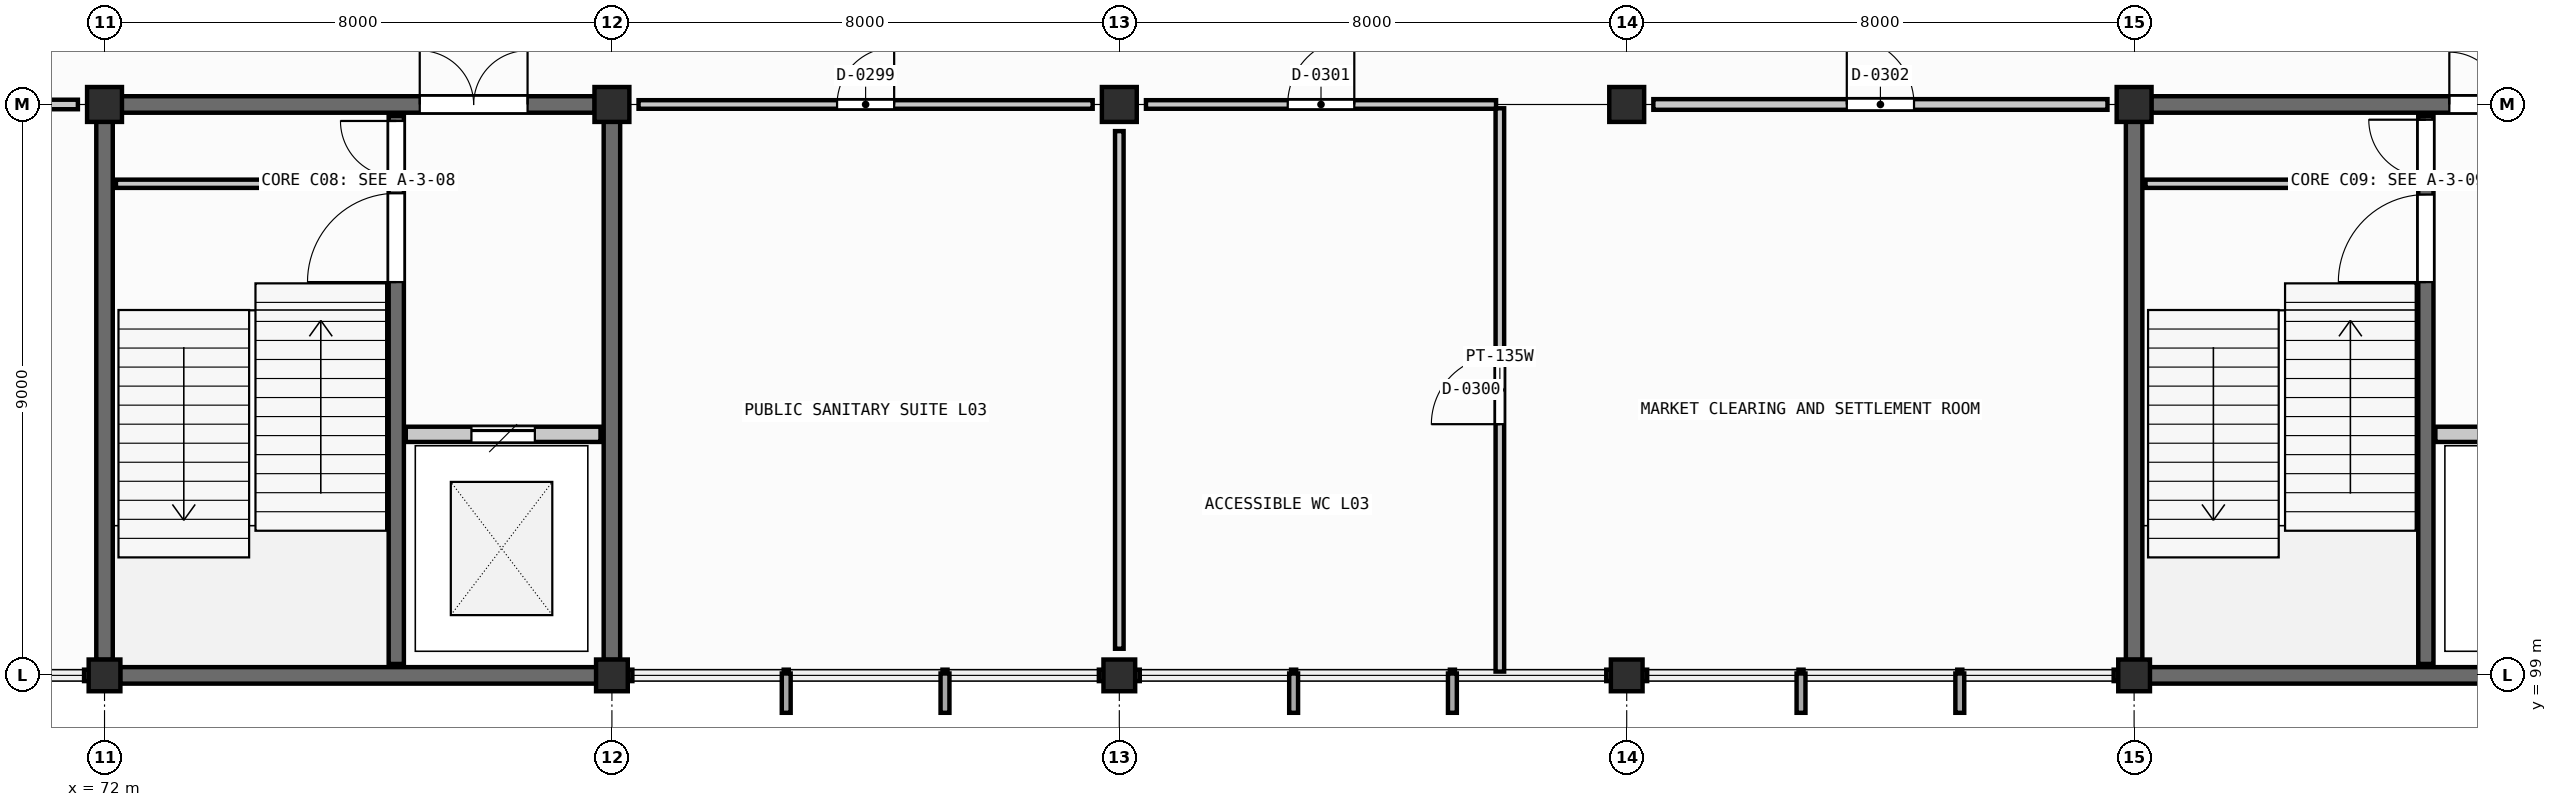
"""IFC4 building model, lengths in metres.
Left out: names, types, materials, properties, quantities, classifications, styles, units other than length and angle.
Written with IfcOpenShell. Run it as: python <this file> out.ifc"""

import sys

from ifc_helpers import new_model, si_unit, direction, frame, frame_2d, origin, origin_2d, place, context, subcontext, project, spatial, rectangle, extrude, element, fill, save


model = new_model("IFC4")
c1 = context("Model", 3, precision=1e-05, world=origin(), true_north=direction((0.0, 1.0)))
c2 = subcontext(c1, "Body", "Model", "MODEL_VIEW")
j1 = project(units=[si_unit("LENGTHUNIT", "METRE"), si_unit("PLANEANGLEUNIT", "RADIAN")], contexts=[c1])
p1 = place(None, origin())
s1 = spatial("IfcSite", under=j1, at=p1, CompositionType="ELEMENT")
p2 = place(p1, origin())
s2 = spatial("IfcBuilding", under=s1, at=p2, CompositionType="ELEMENT")
p3 = place(p2, frame((0.0, 0.0, 13.2)))
s3 = spatial("IfcBuildingStorey", under=s2, at=p3, CompositionType="ELEMENT", Elevation=13.2)
p4 = place(p3, frame((72.0, 99.0, 0.0), z_axis=(0.0, 0.0, 1.0), x_axis=(1.0, 0.0, 0.0)))
e1 = element("IfcColumn", 1, at=p4, inside=s3, PredefinedType="COLUMN", context=c2, shape_type="SweptSolid", body=[
    extrude(rectangle(XDim=0.5, YDim=0.5, at=origin_2d()), origin(), (0.0, 0.0, 1.0), 3.9),
])
p5 = place(p3, frame((72.0, 108.0, 0.0), z_axis=(0.0, 0.0, 1.0), x_axis=(1.0, 0.0, 0.0)))
e2 = element("IfcColumn", 2, at=p5, inside=s3, PredefinedType="COLUMN", context=c2, shape_type="SweptSolid", body=[
    extrude(rectangle(XDim=0.55, YDim=0.55, at=origin_2d()), origin(), (0.0, 0.0, 1.0), 3.9),
])
p6 = place(p3, frame((80.0, 99.0, 0.0), z_axis=(0.0, 0.0, 1.0), x_axis=(1.0, 0.0, 0.0)))
e3 = element("IfcColumn", 3, at=p6, inside=s3, PredefinedType="COLUMN", context=c2, shape_type="SweptSolid", body=[
    extrude(rectangle(XDim=0.5, YDim=0.5, at=origin_2d()), origin(), (0.0, 0.0, 1.0), 3.9),
])
p7 = place(p3, frame((80.0, 108.0, 0.0), z_axis=(0.0, 0.0, 1.0), x_axis=(1.0, 0.0, 0.0)))
e4 = element("IfcColumn", 4, at=p7, inside=s3, PredefinedType="COLUMN", context=c2, shape_type="SweptSolid", body=[
    extrude(rectangle(XDim=0.55, YDim=0.55, at=origin_2d()), origin(), (0.0, 0.0, 1.0), 3.9),
])
p8 = place(p3, frame((88.0, 99.0, 0.0), z_axis=(0.0, 0.0, 1.0), x_axis=(1.0, 0.0, 0.0)))
e5 = element("IfcColumn", 5, at=p8, inside=s3, PredefinedType="COLUMN", context=c2, shape_type="SweptSolid", body=[
    extrude(rectangle(XDim=0.5, YDim=0.5, at=origin_2d()), origin(), (0.0, 0.0, 1.0), 3.9),
])
p9 = place(p3, frame((88.0, 108.0, 0.0), z_axis=(0.0, 0.0, 1.0), x_axis=(1.0, 0.0, 0.0)))
e6 = element("IfcColumn", 6, at=p9, inside=s3, PredefinedType="COLUMN", context=c2, shape_type="SweptSolid", body=[
    extrude(rectangle(XDim=0.55, YDim=0.55, at=origin_2d()), origin(), (0.0, 0.0, 1.0), 3.9),
])
p10 = place(p3, frame((96.0, 99.0, 0.0), z_axis=(0.0, 0.0, 1.0), x_axis=(1.0, 0.0, 0.0)))
e7 = element("IfcColumn", 7, at=p10, inside=s3, PredefinedType="COLUMN", context=c2, shape_type="SweptSolid", body=[
    extrude(rectangle(XDim=0.5, YDim=0.5, at=origin_2d()), origin(), (0.0, 0.0, 1.0), 3.9),
])
p11 = place(p3, frame((96.0, 108.0, 0.0), z_axis=(0.0, 0.0, 1.0), x_axis=(1.0, 0.0, 0.0)))
e8 = element("IfcColumn", 8, at=p11, inside=s3, PredefinedType="COLUMN", context=c2, shape_type="SweptSolid", body=[
    extrude(rectangle(XDim=0.55, YDim=0.55, at=origin_2d()), origin(), (0.0, 0.0, 1.0), 3.9),
])
p12 = place(p3, frame((104.0, 99.0, 0.0), z_axis=(0.0, 0.0, 1.0), x_axis=(1.0, 0.0, 0.0)))
e9 = element("IfcColumn", 9, at=p12, inside=s3, PredefinedType="COLUMN", context=c2, shape_type="SweptSolid", body=[
    extrude(rectangle(XDim=0.5, YDim=0.5, at=origin_2d()), origin(), (0.0, 0.0, 1.0), 3.9),
])
p13 = place(p3, frame((104.0, 108.0, 0.0), z_axis=(0.0, 0.0, 1.0), x_axis=(1.0, 0.0, 0.0)))
e10 = element("IfcColumn", 10, at=p13, inside=s3, PredefinedType="COLUMN", context=c2, shape_type="SweptSolid", body=[
    extrude(rectangle(XDim=0.55, YDim=0.55, at=origin_2d()), origin(), (0.0, 0.0, 1.0), 3.9),
])
p14 = place(p3, frame((72.245, 99.0, 0.0), z_axis=(0.0, 0.0, 1.0), x_axis=(1.0, 0.0, 0.0)))
e11 = element("IfcWall", 11, at=p14, inside=s3, PredefinedType="SHEAR", context=c2, shape_type="SweptSolid", body=[
    extrude(rectangle(XDim=7.51, YDim=0.26, at=frame_2d((3.755, 0.0))), origin(), (0.0, 0.0, 1.0), 3.665),
])
p15 = place(p3, frame((72.27, 108.0, 0.0), z_axis=(0.0, 0.0, 1.0), x_axis=(1.0, 0.0, 0.0)))
e12 = element("IfcWall", 12, at=p15, inside=s3, PredefinedType="SHEAR", context=c2, shape_type="SweptSolid", body=[
    extrude(rectangle(XDim=7.46, YDim=0.26, at=frame_2d((3.73, 0.0))), origin(), (0.0, 0.0, 1.0), 3.665),
])
p16 = place(p15, frame((4.7, 0.0, 0.0)))
e13 = element("IfcOpeningElement", 13, at=p16, cuts=e12, PredefinedType="OPENING", context=c2, shape_type="SweptSolid", body=[
    extrude(rectangle(XDim=1.7, YDim=2.25, at=frame_2d((0.85, 1.125))), frame((0.0, 0.14, 0.0), z_axis=(0.0, -1.0, 0.0), x_axis=(1.0, 0.0, 0.0)), (0.0, 0.0, 1.0), 0.28),
])
for number, where, z_axis, x_axis in (
    (14, (72.0, 99.245, 0.0), (0.0, 0.0, 1.0), (0.0, 1.0, 0.0)),
    (15, (80.0, 99.245, 0.0), (0.0, 0.0, 1.0), (0.0, 1.0, 0.0)),
):
    element("IfcWall", number, at=place(p3, frame(where, z_axis=z_axis, x_axis=x_axis)), inside=s3, PredefinedType="SHEAR", context=c2, shape_type="SweptSolid", body=[
        extrude(rectangle(XDim=8.485, YDim=0.26, at=frame_2d((4.242, 0.0))), origin(), (0.0, 0.0, 1.0), 3.665),
    ])
p17 = place(p3, frame((76.6, 99.18, 0.0), z_axis=(0.0, 0.0, 1.0), x_axis=(0.0, 1.0, 0.0)))
e16 = element("IfcWall", 16, at=p17, inside=s3, PredefinedType="SHEAR", context=c2, shape_type="SweptSolid", body=[
    extrude(rectangle(XDim=8.64, YDim=0.24, at=frame_2d((4.32, 0.0))), origin(), (0.0, 0.0, 1.0), 3.665),
])
p18 = place(p17, frame((6.02, 0.0, 0.0)))
e17 = element("IfcOpeningElement", 17, at=p18, cuts=e16, PredefinedType="OPENING", context=c2, shape_type="SweptSolid", body=[
    extrude(rectangle(XDim=1.4, YDim=2.2, at=frame_2d((0.7, 1.1))), frame((0.0, 0.13, 0.0), z_axis=(0.0, -1.0, 0.0), x_axis=(1.0, 0.0, 0.0)), (0.0, 0.0, 1.0), 0.26),
])
p19 = place(p17, frame((7.68, 0.0, 0.0)))
e18 = element("IfcOpeningElement", 18, at=p19, cuts=e16, PredefinedType="OPENING", context=c2, shape_type="SweptSolid", body=[
    extrude(rectangle(XDim=0.88, YDim=2.02, at=frame_2d((0.44, 1.01))), frame((0.0, 0.13, 0.0), z_axis=(0.0, -1.0, 0.0), x_axis=(1.0, 0.0, 0.0)), (0.0, 0.0, 1.0), 0.26),
])
p20 = place(p3, frame((72.18, 106.75, 0.0), z_axis=(0.0, 0.0, 1.0), x_axis=(1.0, 0.0, 0.0)))
e19 = element("IfcWall", 19, at=p20, inside=s3, PredefinedType="PARTITIONING", context=c2, shape_type="SweptSolid", body=[
    extrude(rectangle(XDim=4.28, YDim=0.13, at=frame_2d((2.14, 0.0))), origin(), (0.0, 0.0, 1.0), 3.015),
])
p21 = place(p3, frame((76.75, 102.8, 0.0), z_axis=(0.0, 0.0, 1.0), x_axis=(1.0, 0.0, 0.0)))
e20 = element("IfcWall", 20, at=p21, inside=s3, PredefinedType="SHEAR", context=c2, shape_type="SweptSolid", body=[
    extrude(rectangle(XDim=3.07, YDim=0.24, at=frame_2d((1.535, 0.0))), origin(), (0.0, 0.0, 1.0), 3.015),
])
p22 = place(p21, frame((1.035, 0.0, 0.0)))
e21 = element("IfcOpeningElement", 21, at=p22, cuts=e20, PredefinedType="OPENING", context=c2, shape_type="SweptSolid", body=[
    extrude(rectangle(XDim=1.0, YDim=2.15, at=frame_2d((0.5, 1.075))), frame((0.0, 0.13, 0.0), z_axis=(0.0, -1.0, 0.0), x_axis=(1.0, 0.0, 0.0)), (0.0, 0.0, 1.0), 0.26),
])
p23 = place(p3, frame((104.245, 99.0, 0.0), z_axis=(0.0, 0.0, 1.0), x_axis=(1.0, 0.0, 0.0)))
e22 = element("IfcWall", 22, at=p23, inside=s3, PredefinedType="SHEAR", context=c2, shape_type="SweptSolid", body=[
    extrude(rectangle(XDim=7.51, YDim=0.26, at=frame_2d((3.755, 0.0))), origin(), (0.0, 0.0, 1.0), 3.665),
])
p24 = place(p3, frame((104.27, 108.0, 0.0), z_axis=(0.0, 0.0, 1.0), x_axis=(1.0, 0.0, 0.0)))
e23 = element("IfcWall", 23, at=p24, inside=s3, PredefinedType="SHEAR", context=c2, shape_type="SweptSolid", body=[
    extrude(rectangle(XDim=7.46, YDim=0.26, at=frame_2d((3.73, 0.0))), origin(), (0.0, 0.0, 1.0), 3.665),
])
p25 = place(p24, frame((4.7, 0.0, 0.0)))
e24 = element("IfcOpeningElement", 24, at=p25, cuts=e23, PredefinedType="OPENING", context=c2, shape_type="SweptSolid", body=[
    extrude(rectangle(XDim=1.65, YDim=2.22, at=frame_2d((0.825, 1.11))), frame((0.0, 0.14, 0.0), z_axis=(0.0, -1.0, 0.0), x_axis=(1.0, 0.0, 0.0)), (0.0, 0.0, 1.0), 0.28),
])
p26 = place(p3, frame((104.0, 99.245, 0.0), z_axis=(0.0, 0.0, 1.0), x_axis=(0.0, 1.0, 0.0)))
e25 = element("IfcWall", 25, at=p26, inside=s3, PredefinedType="SHEAR", context=c2, shape_type="SweptSolid", body=[
    extrude(rectangle(XDim=8.485, YDim=0.26, at=frame_2d((4.242, 0.0))), origin(), (0.0, 0.0, 1.0), 3.665),
])
p27 = place(p3, frame((108.6, 99.18, 0.0), z_axis=(0.0, 0.0, 1.0), x_axis=(0.0, 1.0, 0.0)))
e26 = element("IfcWall", 26, at=p27, inside=s3, PredefinedType="SHEAR", context=c2, shape_type="SweptSolid", body=[
    extrude(rectangle(XDim=8.64, YDim=0.24, at=frame_2d((4.32, 0.0))), origin(), (0.0, 0.0, 1.0), 3.665),
])
p28 = place(p27, frame((6.02, 0.0, 0.0)))
e27 = element("IfcOpeningElement", 27, at=p28, cuts=e26, PredefinedType="OPENING", context=c2, shape_type="SweptSolid", body=[
    extrude(rectangle(XDim=1.38, YDim=2.22, at=frame_2d((0.69, 1.11))), frame((0.0, 0.13, 0.0), z_axis=(0.0, -1.0, 0.0), x_axis=(1.0, 0.0, 0.0)), (0.0, 0.0, 1.0), 0.26),
])
p29 = place(p27, frame((7.68, 0.0, 0.0)))
e28 = element("IfcOpeningElement", 28, at=p29, cuts=e26, PredefinedType="OPENING", context=c2, shape_type="SweptSolid", body=[
    extrude(rectangle(XDim=0.9, YDim=2.05, at=frame_2d((0.45, 1.025))), frame((0.0, 0.13, 0.0), z_axis=(0.0, -1.0, 0.0), x_axis=(1.0, 0.0, 0.0)), (0.0, 0.0, 1.0), 0.26),
])
p30 = place(p3, frame((104.18, 106.75, 0.0), z_axis=(0.0, 0.0, 1.0), x_axis=(1.0, 0.0, 0.0)))
e29 = element("IfcWall", 29, at=p30, inside=s3, PredefinedType="PARTITIONING", context=c2, shape_type="SweptSolid", body=[
    extrude(rectangle(XDim=4.28, YDim=0.13, at=frame_2d((2.14, 0.0))), origin(), (0.0, 0.0, 1.0), 3.015),
])
p31 = place(p3, frame((108.75, 102.8, 0.0), z_axis=(0.0, 0.0, 1.0), x_axis=(1.0, 0.0, 0.0)))
e30 = element("IfcWall", 30, at=p31, inside=s3, PredefinedType="SHEAR", context=c2, shape_type="SweptSolid", body=[
    extrude(rectangle(XDim=3.07, YDim=0.24, at=frame_2d((1.535, 0.0))), origin(), (0.0, 0.0, 1.0), 3.015),
])
p32 = place(p31, frame((1.035, 0.0, 0.0)))
e31 = element("IfcOpeningElement", 31, at=p32, cuts=e30, PredefinedType="OPENING", context=c2, shape_type="SweptSolid", body=[
    extrude(rectangle(XDim=1.0, YDim=2.15, at=frame_2d((0.5, 1.075))), frame((0.0, 0.13, 0.0), z_axis=(0.0, -1.0, 0.0), x_axis=(1.0, 0.0, 0.0)), (0.0, 0.0, 1.0), 0.26),
])
p33 = place(p3, frame((64.82, 108.0, 0.0), z_axis=(0.0, 0.0, 1.0), x_axis=(1.0, 0.0, 0.0)))
e32 = element("IfcWall", 32, at=p33, inside=s3, PredefinedType="PARTITIONING", context=c2, shape_type="SweptSolid", body=[
    extrude(rectangle(XDim=6.76, YDim=0.15, at=frame_2d((3.38, 0.0))), origin(), (0.0, 0.0, 1.0), 2.75),
])
p34 = place(p33, frame((2.78, 0.0, 0.0)))
e33 = element("IfcOpeningElement", 33, at=p34, cuts=e32, PredefinedType="OPENING", context=c2, shape_type="SweptSolid", body=[
    extrude(rectangle(XDim=1.2, YDim=2.15, at=frame_2d((0.6, 1.075))), frame((0.0, 0.085, 0.0), z_axis=(0.0, -1.0, 0.0), x_axis=(1.0, 0.0, 0.0)), (0.0, 0.0, 1.0), 0.17),
])
p35 = place(p3, frame((88.0, 99.42, 0.0), z_axis=(0.0, 0.0, 1.0), x_axis=(0.0, 1.0, 0.0)))
e34 = element("IfcWall", 34, at=p35, inside=s3, PredefinedType="PLUMBINGWALL", context=c2, shape_type="SweptSolid", body=[
    extrude(rectangle(XDim=8.16, YDim=0.135, at=frame_2d((4.08, 0.0))), origin(), (0.0, 0.0, 1.0), 2.75),
])
p36 = place(p3, frame((80.42, 108.0, 0.0), z_axis=(0.0, 0.0, 1.0), x_axis=(1.0, 0.0, 0.0)))
e35 = element("IfcWall", 35, at=p36, inside=s3, PredefinedType="PLUMBINGWALL", context=c2, shape_type="SweptSolid", body=[
    extrude(rectangle(XDim=7.16, YDim=0.135, at=frame_2d((3.58, 0.0))), origin(), (0.0, 0.0, 1.0), 2.75),
])
p37 = place(p36, frame((3.13, 0.0, 0.0)))
e36 = element("IfcOpeningElement", 36, at=p37, cuts=e35, PredefinedType="OPENING", context=c2, shape_type="SweptSolid", body=[
    extrude(rectangle(XDim=0.9, YDim=2.06, at=frame_2d((0.45, 1.03))), frame((0.0, 0.078, 0.0), z_axis=(0.0, -1.0, 0.0), x_axis=(1.0, 0.0, 0.0)), (0.0, 0.0, 1.0), 0.155),
])
p38 = place(p3, frame((94.0, 99.06, 0.0), z_axis=(0.0, 0.0, 1.0), x_axis=(0.0, 1.0, 0.0)))
e37 = element("IfcWall", 37, at=p38, inside=s3, PredefinedType="PLUMBINGWALL", context=c2, shape_type="SweptSolid", body=[
    extrude(rectangle(XDim=8.88, YDim=0.135, at=frame_2d((4.44, 0.0))), origin(), (0.0, 0.0, 1.0), 2.75),
])
p39 = place(p38, frame((3.9, 0.0, 0.0)))
e38 = element("IfcOpeningElement", 38, at=p39, cuts=e37, PredefinedType="OPENING", context=c2, shape_type="SweptSolid", body=[
    extrude(rectangle(XDim=1.08, YDim=2.12, at=frame_2d((0.54, 1.06))), frame((0.0, 0.078, 0.0), z_axis=(0.0, -1.0, 0.0), x_axis=(1.0, 0.0, 0.0)), (0.0, 0.0, 1.0), 0.155),
])
p40 = place(p3, frame((88.42, 108.0, 0.0), z_axis=(0.0, 0.0, 1.0), x_axis=(1.0, 0.0, 0.0)))
e39 = element("IfcWall", 39, at=p40, inside=s3, PredefinedType="PLUMBINGWALL", context=c2, shape_type="SweptSolid", body=[
    extrude(rectangle(XDim=5.52, YDim=0.135, at=frame_2d((2.76, 0.0))), origin(), (0.0, 0.0, 1.0), 2.75),
])
p41 = place(p40, frame((2.235, 0.0, 0.0)))
e40 = element("IfcOpeningElement", 40, at=p41, cuts=e39, PredefinedType="OPENING", context=c2, shape_type="SweptSolid", body=[
    extrude(rectangle(XDim=1.05, YDim=2.1, at=frame_2d((0.525, 1.05))), frame((0.0, 0.078, 0.0), z_axis=(0.0, -1.0, 0.0), x_axis=(1.0, 0.0, 0.0)), (0.0, 0.0, 1.0), 0.155),
])
p42 = place(p3, frame((96.42, 108.0, 0.0), z_axis=(0.0, 0.0, 1.0), x_axis=(1.0, 0.0, 0.0)))
e41 = element("IfcWall", 41, at=p42, inside=s3, PredefinedType="PARTITIONING", context=c2, shape_type="SweptSolid", body=[
    extrude(rectangle(XDim=7.16, YDim=0.168, at=frame_2d((3.58, 0.0))), origin(), (0.0, 0.0, 1.0), 2.75),
])
p43 = place(p42, frame((3.05, 0.0, 0.0)))
e42 = element("IfcOpeningElement", 42, at=p43, cuts=e41, PredefinedType="OPENING", context=c2, shape_type="SweptSolid", body=[
    extrude(rectangle(XDim=1.06, YDim=2.17, at=frame_2d((0.53, 1.085))), frame((0.0, 0.094, 0.0), z_axis=(0.0, -1.0, 0.0), x_axis=(1.0, 0.0, 0.0)), (0.0, 0.0, 1.0), 0.188),
])
p44 = place(p18, origin())
e43 = element("IfcDoor", 43, at=p44, inside=s3, OperationType="SINGLE_SWING_LEFT", PredefinedType="DOOR", context=c2, shape_type="SweptSolid", body=[
    extrude(rectangle(XDim=1.4, YDim=2.2, at=frame_2d((0.7, 1.1))), frame((0.0, 0.025, 0.0), z_axis=(0.0, -1.0, 0.0), x_axis=(1.0, 0.0, 0.0)), (0.0, 0.0, 1.0), 0.05),
])
fill(e17, e43)
p45 = place(p19, origin())
e44 = element("IfcDoor", 44, at=p45, inside=s3, OperationType="SINGLE_SWING_RIGHT", PredefinedType="DOOR", context=c2, shape_type="SweptSolid", body=[
    extrude(rectangle(XDim=0.88, YDim=2.02, at=frame_2d((0.44, 1.01))), frame((0.0, 0.025, 0.0), z_axis=(0.0, -1.0, 0.0), x_axis=(1.0, 0.0, 0.0)), (0.0, 0.0, 1.0), 0.05),
])
fill(e18, e44)
p46 = place(p16, origin())
e45 = element("IfcDoor", 45, at=p46, inside=s3, OperationType="DOUBLE_DOOR_SINGLE_SWING", PredefinedType="DOOR", context=c2, shape_type="SweptSolid", body=[
    extrude(rectangle(XDim=1.7, YDim=2.25, at=frame_2d((0.85, 1.125))), frame((0.0, 0.025, 0.0), z_axis=(0.0, -1.0, 0.0), x_axis=(1.0, 0.0, 0.0)), (0.0, 0.0, 1.0), 0.05),
])
fill(e13, e45)
p47 = place(p22, origin())
e46 = element("IfcDoor", 46, at=p47, inside=s3, OperationType="SLIDING_TO_LEFT", PredefinedType="DOOR", context=c2, shape_type="SweptSolid", body=[
    extrude(rectangle(XDim=1.0, YDim=2.15, at=frame_2d((0.5, 1.075))), frame((0.0, 0.025, 0.0), z_axis=(0.0, -1.0, 0.0), x_axis=(1.0, 0.0, 0.0)), (0.0, 0.0, 1.0), 0.05),
])
fill(e21, e46)
p48 = place(p28, origin())
e47 = element("IfcDoor", 47, at=p48, inside=s3, OperationType="SINGLE_SWING_LEFT", PredefinedType="DOOR", context=c2, shape_type="SweptSolid", body=[
    extrude(rectangle(XDim=1.38, YDim=2.22, at=frame_2d((0.69, 1.11))), frame((0.0, 0.025, 0.0), z_axis=(0.0, -1.0, 0.0), x_axis=(1.0, 0.0, 0.0)), (0.0, 0.0, 1.0), 0.05),
])
fill(e27, e47)
p49 = place(p29, origin())
e48 = element("IfcDoor", 48, at=p49, inside=s3, OperationType="SINGLE_SWING_RIGHT", PredefinedType="DOOR", context=c2, shape_type="SweptSolid", body=[
    extrude(rectangle(XDim=0.9, YDim=2.05, at=frame_2d((0.45, 1.025))), frame((0.0, 0.025, 0.0), z_axis=(0.0, -1.0, 0.0), x_axis=(1.0, 0.0, 0.0)), (0.0, 0.0, 1.0), 0.05),
])
fill(e28, e48)
p50 = place(p25, origin())
e49 = element("IfcDoor", 49, at=p50, inside=s3, OperationType="DOUBLE_DOOR_SINGLE_SWING", PredefinedType="DOOR", context=c2, shape_type="SweptSolid", body=[
    extrude(rectangle(XDim=1.65, YDim=2.22, at=frame_2d((0.825, 1.11))), frame((0.0, 0.025, 0.0), z_axis=(0.0, -1.0, 0.0), x_axis=(1.0, 0.0, 0.0)), (0.0, 0.0, 1.0), 0.05),
])
fill(e24, e49)
p51 = place(p37, origin())
e50 = element("IfcDoor", 50, at=p51, inside=s3, OperationType="SINGLE_SWING_RIGHT", PredefinedType="DOOR", context=c2, shape_type="SweptSolid", body=[
    extrude(rectangle(XDim=0.9, YDim=2.06, at=frame_2d((0.45, 1.03))), frame((0.0, 0.025, 0.0), z_axis=(0.0, -1.0, 0.0), x_axis=(1.0, 0.0, 0.0)), (0.0, 0.0, 1.0), 0.05),
])
fill(e36, e50)
p52 = place(p39, origin())
e51 = element("IfcDoor", 51, at=p52, inside=s3, OperationType="SINGLE_SWING_LEFT", PredefinedType="DOOR", context=c2, shape_type="SweptSolid", body=[
    extrude(rectangle(XDim=1.08, YDim=2.12, at=frame_2d((0.54, 1.06))), frame((0.0, 0.025, 0.0), z_axis=(0.0, -1.0, 0.0), x_axis=(1.0, 0.0, 0.0)), (0.0, 0.0, 1.0), 0.05),
])
fill(e38, e51)
p53 = place(p41, origin())
e52 = element("IfcDoor", 52, at=p53, inside=s3, OperationType="SINGLE_SWING_RIGHT", PredefinedType="DOOR", context=c2, shape_type="SweptSolid", body=[
    extrude(rectangle(XDim=1.05, YDim=2.1, at=frame_2d((0.525, 1.05))), frame((0.0, 0.025, 0.0), z_axis=(0.0, -1.0, 0.0), x_axis=(1.0, 0.0, 0.0)), (0.0, 0.0, 1.0), 0.05),
])
fill(e40, e52)
p54 = place(p43, origin())
e53 = element("IfcDoor", 53, at=p54, inside=s3, OperationType="SINGLE_SWING_LEFT", PredefinedType="DOOR", context=c2, shape_type="SweptSolid", body=[
    extrude(rectangle(XDim=1.06, YDim=2.17, at=frame_2d((0.53, 1.085))), frame((0.0, 0.025, 0.0), z_axis=(0.0, -1.0, 0.0), x_axis=(1.0, 0.0, 0.0)), (0.0, 0.0, 1.0), 0.05),
])
fill(e42, e53)
save(model, sys.argv[1])
